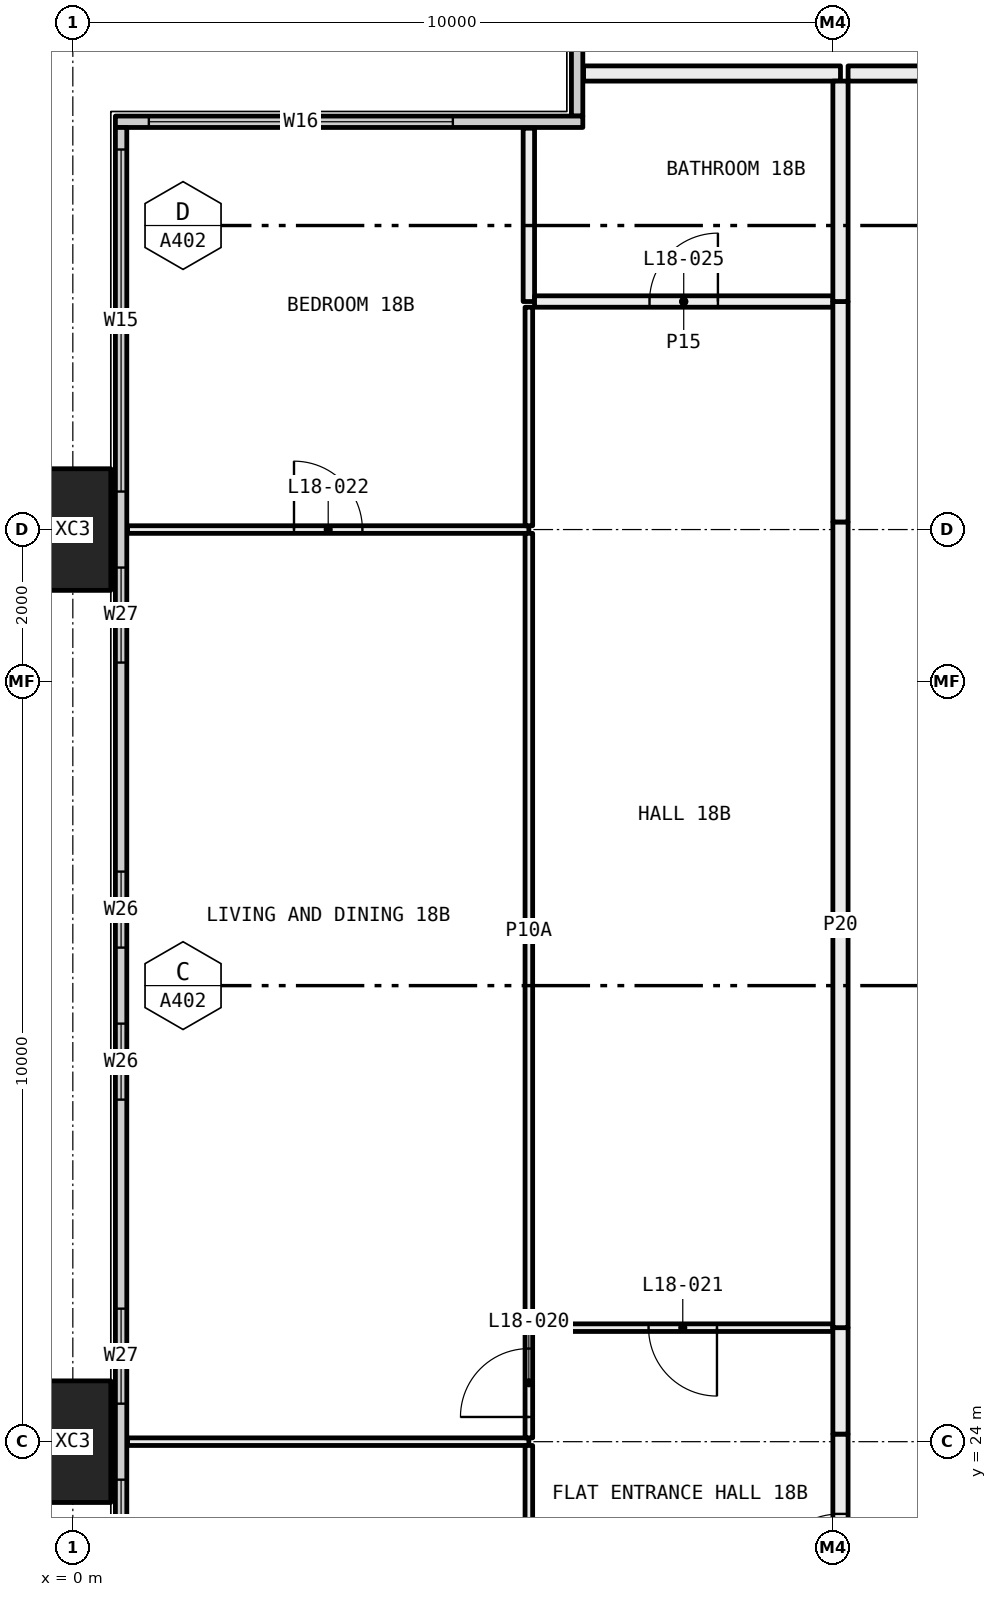
"""IFC4 building model, lengths in metres.
Left out: names, types, materials, properties, quantities, classifications, styles, units other than length and angle.
Written with IfcOpenShell. Run it as: python <this file> out.ifc"""

import sys

from ifc_helpers import new_model, si_unit, direction, frame, frame_2d, origin, origin_2d, place, context, subcontext, project, spatial, rectangle, hollow_rectangle, extrude, element, fill, save


model = new_model("IFC4")
c1 = context("Model", 3, precision=1e-05, world=origin(), true_north=direction((0.0, 1.0)))
c2 = subcontext(c1, "Body", "Model", "MODEL_VIEW")
j1 = project(units=[si_unit("LENGTHUNIT", "METRE"), si_unit("PLANEANGLEUNIT", "RADIAN")], contexts=[c1])
p1 = place(None, origin())
s1 = spatial("IfcSite", under=j1, at=p1, CompositionType="ELEMENT")
p2 = place(p1, origin())
s2 = spatial("IfcBuilding", under=s1, at=p2, CompositionType="ELEMENT")
p3 = place(p2, frame((0.0, 0.0, 74.85)))
s3 = spatial("IfcBuildingStorey", under=s2, at=p3, CompositionType="ELEMENT", Elevation=74.85)
for number, where, z_axis, x_axis in (
    (1, (0.0, 24.0, -0.4), (0.0, 0.0, 1.0), (0.0, 1.0, 0.0)),
    (2, (0.0, 36.0, -0.4), (0.0, 0.0, 1.0), (0.0, 1.0, 0.0)),
):
    element("IfcColumn", number, at=place(p3, frame(where, z_axis=z_axis, x_axis=x_axis)), inside=s3, PredefinedType="COLUMN", context=c2, shape_type="SweptSolid", body=[
        extrude(hollow_rectangle(XDim=1.6, YDim=1.0, WallThickness=0.065, at=origin_2d()), origin(), (0.0, 0.0, 1.0), 3.45),
    ])
p4 = place(p3, frame((6.635, 41.44, 0.0), z_axis=(0.0, 0.0, 1.0), x_axis=(0.0, 1.0, 0.0)))
e3 = element("IfcWall", 3, at=p4, inside=s3, PredefinedType="ELEMENTEDWALL", context=c2, shape_type="SweptSolid", body=[
    extrude(rectangle(XDim=5.85, YDim=0.15, at=frame_2d((2.925, 0.0))), origin(), (0.0, 0.0, 1.0), 3.05),
])
p5 = place(p4, frame((1.56, 0.0, 0.45)))
e4 = element("IfcOpeningElement", 4, at=p5, cuts=e3, PredefinedType="OPENING", context=c2, shape_type="SweptSolid", body=[
    extrude(rectangle(XDim=4.0, YDim=2.55, at=frame_2d((2.0, 1.275))), frame((0.0, 0.085, 0.0), z_axis=(0.0, -1.0, 0.0), x_axis=(1.0, 0.0, 0.0)), (0.0, 0.0, 1.0), 0.17),
])
p6 = place(p3, frame((0.56, 41.365, 0.0), z_axis=(0.0, 0.0, 1.0), x_axis=(1.0, 0.0, 0.0)))
e5 = element("IfcWall", 5, at=p6, inside=s3, PredefinedType="ELEMENTEDWALL", context=c2, shape_type="SweptSolid", body=[
    extrude(rectangle(XDim=6.15, YDim=0.15, at=frame_2d((3.075, 0.0))), origin(), (0.0, 0.0, 1.0), 3.05),
])
p7 = place(p6, frame((0.44, 0.0, 0.45)))
e6 = element("IfcOpeningElement", 6, at=p7, cuts=e5, PredefinedType="OPENING", context=c2, shape_type="SweptSolid", body=[
    extrude(rectangle(XDim=4.0, YDim=2.55, at=frame_2d((2.0, 1.275))), frame((0.0, 0.085, 0.0), z_axis=(0.0, -1.0, 0.0), x_axis=(1.0, 0.0, 0.0)), (0.0, 0.0, 1.0), 0.17),
])
p8 = place(p3, frame((0.635, 6.71, 0.0), z_axis=(0.0, 0.0, 1.0), x_axis=(0.0, 1.0, 0.0)))
e7 = element("IfcWall", 7, at=p8, inside=s3, PredefinedType="ELEMENTEDWALL", context=c2, shape_type="SweptSolid", body=[
    extrude(rectangle(XDim=34.58, YDim=0.15, at=frame_2d((17.29, 0.0))), origin(), (0.0, 0.0, 1.0), 3.05),
])
p9 = place(p8, frame((0.29, 0.0, 0.45)))
e8 = element("IfcOpeningElement", 8, at=p9, cuts=e7, PredefinedType="OPENING", context=c2, shape_type="SweptSolid", body=[
    extrude(rectangle(XDim=4.5, YDim=2.55, at=frame_2d((2.25, 1.275))), frame((0.0, 0.085, 0.0), z_axis=(0.0, -1.0, 0.0), x_axis=(1.0, 0.0, 0.0)), (0.0, 0.0, 1.0), 0.17),
])
p10 = place(p8, frame((5.79, 0.0, 0.45)))
e9 = element("IfcOpeningElement", 9, at=p10, cuts=e7, PredefinedType="OPENING", context=c2, shape_type="SweptSolid", body=[
    extrude(rectangle(XDim=1.25, YDim=2.55, at=frame_2d((0.625, 1.275))), frame((0.0, 0.085, 0.0), z_axis=(0.0, -1.0, 0.0), x_axis=(1.0, 0.0, 0.0)), (0.0, 0.0, 1.0), 0.17),
])
p11 = place(p8, frame((9.79, 0.0, 0.45)))
e10 = element("IfcOpeningElement", 10, at=p11, cuts=e7, PredefinedType="OPENING", context=c2, shape_type="SweptSolid", body=[
    extrude(rectangle(XDim=1.0, YDim=2.55, at=frame_2d((0.5, 1.275))), frame((0.0, 0.085, 0.0), z_axis=(0.0, -1.0, 0.0), x_axis=(1.0, 0.0, 0.0)), (0.0, 0.0, 1.0), 0.17),
])
p12 = place(p8, frame((11.79, 0.0, 0.45)))
e11 = element("IfcOpeningElement", 11, at=p12, cuts=e7, PredefinedType="OPENING", context=c2, shape_type="SweptSolid", body=[
    extrude(rectangle(XDim=1.0, YDim=2.55, at=frame_2d((0.5, 1.275))), frame((0.0, 0.085, 0.0), z_axis=(0.0, -1.0, 0.0), x_axis=(1.0, 0.0, 0.0)), (0.0, 0.0, 1.0), 0.17),
])
p13 = place(p8, frame((15.54, 0.0, 0.45)))
e12 = element("IfcOpeningElement", 12, at=p13, cuts=e7, PredefinedType="OPENING", context=c2, shape_type="SweptSolid", body=[
    extrude(rectangle(XDim=1.25, YDim=2.55, at=frame_2d((0.625, 1.275))), frame((0.0, 0.085, 0.0), z_axis=(0.0, -1.0, 0.0), x_axis=(1.0, 0.0, 0.0)), (0.0, 0.0, 1.0), 0.17),
])
p14 = place(p8, frame((17.79, 0.0, 0.45)))
e13 = element("IfcOpeningElement", 13, at=p14, cuts=e7, PredefinedType="OPENING", context=c2, shape_type="SweptSolid", body=[
    extrude(rectangle(XDim=1.25, YDim=2.55, at=frame_2d((0.625, 1.275))), frame((0.0, 0.085, 0.0), z_axis=(0.0, -1.0, 0.0), x_axis=(1.0, 0.0, 0.0)), (0.0, 0.0, 1.0), 0.17),
])
p15 = place(p8, frame((21.79, 0.0, 0.45)))
e14 = element("IfcOpeningElement", 14, at=p15, cuts=e7, PredefinedType="OPENING", context=c2, shape_type="SweptSolid", body=[
    extrude(rectangle(XDim=1.0, YDim=2.55, at=frame_2d((0.5, 1.275))), frame((0.0, 0.085, 0.0), z_axis=(0.0, -1.0, 0.0), x_axis=(1.0, 0.0, 0.0)), (0.0, 0.0, 1.0), 0.17),
])
p16 = place(p8, frame((23.79, 0.0, 0.45)))
e15 = element("IfcOpeningElement", 15, at=p16, cuts=e7, PredefinedType="OPENING", context=c2, shape_type="SweptSolid", body=[
    extrude(rectangle(XDim=1.0, YDim=2.55, at=frame_2d((0.5, 1.275))), frame((0.0, 0.085, 0.0), z_axis=(0.0, -1.0, 0.0), x_axis=(1.0, 0.0, 0.0)), (0.0, 0.0, 1.0), 0.17),
])
p17 = place(p8, frame((27.54, 0.0, 0.45)))
e16 = element("IfcOpeningElement", 16, at=p17, cuts=e7, PredefinedType="OPENING", context=c2, shape_type="SweptSolid", body=[
    extrude(rectangle(XDim=1.25, YDim=2.55, at=frame_2d((0.625, 1.275))), frame((0.0, 0.085, 0.0), z_axis=(0.0, -1.0, 0.0), x_axis=(1.0, 0.0, 0.0)), (0.0, 0.0, 1.0), 0.17),
])
p18 = place(p8, frame((29.79, 0.0, 0.45)))
e17 = element("IfcOpeningElement", 17, at=p18, cuts=e7, PredefinedType="OPENING", context=c2, shape_type="SweptSolid", body=[
    extrude(rectangle(XDim=4.5, YDim=2.55, at=frame_2d((2.25, 1.275))), frame((0.0, 0.085, 0.0), z_axis=(0.0, -1.0, 0.0), x_axis=(1.0, 0.0, 0.0)), (0.0, 0.0, 1.0), 0.17),
])
p19 = place(p3, frame((6.0, 24.0, 0.0), z_axis=(0.0, 0.0, 1.0), x_axis=(-1.0, 0.0, 0.0)))
e18 = element("IfcWall", 18, at=p19, inside=s3, PredefinedType="PARTITIONING", context=c2, shape_type="SweptSolid", body=[
    extrude(rectangle(XDim=5.28, YDim=0.1, at=frame_2d((2.64, 0.0))), origin(), (0.0, 0.0, 1.0), 2.45),
])
p20 = place(p3, frame((6.0, 21.075, 0.0), z_axis=(0.0, 0.0, 1.0), x_axis=(0.0, 1.0, 0.0)))
e19 = element("IfcWall", 19, at=p20, inside=s3, PredefinedType="PARTITIONING", context=c2, shape_type="SweptSolid", body=[
    extrude(rectangle(XDim=2.875, YDim=0.1, at=frame_2d((1.438, 0.0))), origin(), (0.0, 0.0, 1.0), 2.45),
])
p21 = place(p20, frame((0.988, 0.0, 0.0)))
e20 = element("IfcOpeningElement", 20, at=p21, cuts=e19, PredefinedType="OPENING", context=c2, shape_type="SweptSolid", body=[
    extrude(rectangle(XDim=0.9, YDim=2.1, at=frame_2d((0.45, 1.05))), frame((0.0, 0.06, 0.0), z_axis=(0.0, -1.0, 0.0), x_axis=(1.0, 0.0, 0.0)), (0.0, 0.0, 1.0), 0.12),
])
p22 = place(p3, frame((6.0, 36.0, 0.0), z_axis=(0.0, 0.0, 1.0), x_axis=(-1.0, 0.0, 0.0)))
e21 = element("IfcWall", 21, at=p22, inside=s3, PredefinedType="PARTITIONING", context=c2, shape_type="SweptSolid", body=[
    extrude(rectangle(XDim=5.28, YDim=0.1, at=frame_2d((2.64, 0.0))), origin(), (0.0, 0.0, 1.0), 2.45),
])
p23 = place(p22, frame((2.19, 0.0, 0.0)))
e22 = element("IfcOpeningElement", 22, at=p23, cuts=e21, PredefinedType="OPENING", context=c2, shape_type="SweptSolid", body=[
    extrude(rectangle(XDim=0.9, YDim=2.1, at=frame_2d((0.45, 1.05))), frame((0.0, 0.06, 0.0), z_axis=(0.0, -1.0, 0.0), x_axis=(1.0, 0.0, 0.0)), (0.0, 0.0, 1.0), 0.12),
])
p24 = place(p3, frame((6.0, 24.05, 0.0), z_axis=(0.0, 0.0, 1.0), x_axis=(0.0, 1.0, 0.0)))
e23 = element("IfcWall", 23, at=p24, inside=s3, PredefinedType="PARTITIONING", context=c2, shape_type="SweptSolid", body=[
    extrude(rectangle(XDim=1.45, YDim=0.1, at=frame_2d((0.725, 0.0))), origin(), (0.0, 0.0, 1.0), 2.45),
])
p25 = place(p24, frame((0.275, 0.0, 0.0)))
e24 = element("IfcOpeningElement", 24, at=p25, cuts=e23, PredefinedType="OPENING", context=c2, shape_type="SweptSolid", body=[
    extrude(rectangle(XDim=0.9, YDim=2.1, at=frame_2d((0.45, 1.05))), frame((0.0, 0.06, 0.0), z_axis=(0.0, -1.0, 0.0), x_axis=(1.0, 0.0, 0.0)), (0.0, 0.0, 1.0), 0.12),
])
p26 = place(p3, frame((6.0, 25.5, 0.0), z_axis=(0.0, 0.0, 1.0), x_axis=(0.0, 1.0, 0.0)))
e25 = element("IfcWall", 25, at=p26, inside=s3, PredefinedType="PARTITIONING", context=c2, shape_type="SweptSolid", body=[
    extrude(rectangle(XDim=10.45, YDim=0.1, at=frame_2d((5.225, 0.0))), origin(), (0.0, 0.0, 1.0), 2.45),
])
p27 = place(p3, frame((6.0, 36.05, 0.0), z_axis=(0.0, 0.0, 1.0), x_axis=(0.0, 1.0, 0.0)))
e26 = element("IfcWall", 26, at=p27, inside=s3, PredefinedType="PARTITIONING", context=c2, shape_type="SweptSolid", body=[
    extrude(rectangle(XDim=2.875, YDim=0.1, at=frame_2d((1.438, 0.0))), origin(), (0.0, 0.0, 1.0), 2.45),
])
p28 = place(p3, frame((6.0, 39.0, 0.0), z_axis=(0.0, 0.0, 1.0), x_axis=(0.0, 1.0, 0.0)))
e27 = element("IfcWall", 27, at=p28, inside=s3, PredefinedType="PARTITIONING", context=c2, shape_type="SweptSolid", body=[
    extrude(rectangle(XDim=2.28, YDim=0.15, at=frame_2d((1.14, 0.0))), origin(), (0.0, 0.0, 1.0), 3.05),
])
p29 = place(p3, frame((10.0, 25.5, 0.0), z_axis=(0.0, 0.0, 1.0), x_axis=(-1.0, 0.0, 0.0)))
e28 = element("IfcWall", 28, at=p29, inside=s3, PredefinedType="PARTITIONING", context=c2, shape_type="SweptSolid", body=[
    extrude(rectangle(XDim=3.95, YDim=0.1, at=frame_2d((1.975, 0.0))), origin(), (0.0, 0.0, 1.0), 3.05),
])
p30 = place(p29, frame((1.525, 0.0, 0.0)))
e29 = element("IfcOpeningElement", 29, at=p30, cuts=e28, PredefinedType="OPENING", context=c2, shape_type="SweptSolid", body=[
    extrude(rectangle(XDim=0.9, YDim=2.1, at=frame_2d((0.45, 1.05))), frame((0.0, 0.06, 0.0), z_axis=(0.0, -1.0, 0.0), x_axis=(1.0, 0.0, 0.0)), (0.0, 0.0, 1.0), 0.12),
])
p31 = place(p3, frame((10.1, 21.0, 0.0), z_axis=(0.0, 0.0, 1.0), x_axis=(0.0, 1.0, 0.0)))
e30 = element("IfcWall", 30, at=p31, inside=s3, PredefinedType="PARTITIONING", context=c2, shape_type="SweptSolid", body=[
    extrude(rectangle(XDim=3.1, YDim=0.2, at=frame_2d((1.55, 0.0))), origin(), (0.0, 0.0, 1.0), 2.45),
])
p32 = place(p31, frame((1.05, 0.0, 0.0)))
e31 = element("IfcOpeningElement", 31, at=p32, cuts=e30, PredefinedType="OPENING", context=c2, shape_type="SweptSolid", body=[
    extrude(rectangle(XDim=1.0, YDim=2.1, at=frame_2d((0.5, 1.05))), frame((0.0, 0.11, 0.0), z_axis=(0.0, -1.0, 0.0), x_axis=(1.0, 0.0, 0.0)), (0.0, 0.0, 1.0), 0.22),
])
p33 = place(p3, frame((10.1, 24.1, 0.0), z_axis=(0.0, 0.0, 1.0), x_axis=(0.0, 1.0, 0.0)))
e32 = element("IfcWall", 32, at=p33, inside=s3, PredefinedType="PARTITIONING", context=c2, shape_type="SweptSolid", body=[
    extrude(rectangle(XDim=1.4, YDim=0.2, at=frame_2d((0.7, 0.0))), origin(), (0.0, 0.0, 1.0), 3.05),
])
p34 = place(p3, frame((10.0, 39.0, 0.0), z_axis=(0.0, 0.0, 1.0), x_axis=(-1.0, 0.0, 0.0)))
e33 = element("IfcWall", 33, at=p34, inside=s3, PredefinedType="PARTITIONING", context=c2, shape_type="SweptSolid", body=[
    extrude(rectangle(XDim=3.925, YDim=0.15, at=frame_2d((1.962, 0.0))), origin(), (0.0, 0.0, 1.0), 3.05),
])
p35 = place(p34, frame((1.512, 0.0, 0.0)))
e34 = element("IfcOpeningElement", 34, at=p35, cuts=e33, PredefinedType="OPENING", context=c2, shape_type="SweptSolid", body=[
    extrude(rectangle(XDim=0.9, YDim=2.1, at=frame_2d((0.45, 1.05))), frame((0.0, 0.085, 0.0), z_axis=(0.0, -1.0, 0.0), x_axis=(1.0, 0.0, 0.0)), (0.0, 0.0, 1.0), 0.17),
])
p36 = place(p3, frame((10.1, 25.5, 0.0), z_axis=(0.0, 0.0, 1.0), x_axis=(0.0, 1.0, 0.0)))
e35 = element("IfcWall", 35, at=p36, inside=s3, PredefinedType="PARTITIONING", context=c2, shape_type="SweptSolid", body=[
    extrude(rectangle(XDim=10.6, YDim=0.2, at=frame_2d((5.3, 0.0))), origin(), (0.0, 0.0, 1.0), 2.45),
])
p37 = place(p3, frame((10.1, 36.1, 0.0), z_axis=(0.0, 0.0, 1.0), x_axis=(0.0, 1.0, 0.0)))
e36 = element("IfcWall", 36, at=p37, inside=s3, PredefinedType="PARTITIONING", context=c2, shape_type="SweptSolid", body=[
    extrude(rectangle(XDim=2.9, YDim=0.2, at=frame_2d((1.45, 0.0))), origin(), (0.0, 0.0, 1.0), 3.05),
])
p38 = place(p3, frame((10.1, 42.0, 0.0), z_axis=(0.0, 0.0, 1.0), x_axis=(-1.0, 0.0, 0.0)))
e37 = element("IfcWall", 37, at=p38, inside=s3, PredefinedType="PARTITIONING", context=c2, shape_type="SweptSolid", body=[
    extrude(rectangle(XDim=3.38, YDim=0.2, at=frame_2d((1.69, 0.0))), origin(), (0.0, 0.0, 1.0), 3.05),
])
p39 = place(p3, frame((10.1, 39.0, 0.0), z_axis=(0.0, 0.0, 1.0), x_axis=(0.0, 1.0, 0.0)))
e38 = element("IfcWall", 38, at=p39, inside=s3, PredefinedType="PARTITIONING", context=c2, shape_type="SweptSolid", body=[
    extrude(rectangle(XDim=2.9, YDim=0.2, at=frame_2d((1.45, 0.0))), origin(), (0.0, 0.0, 1.0), 3.05),
])
p40 = place(p3, frame((10.2, 42.0, 0.0), z_axis=(0.0, 0.0, 1.0), x_axis=(1.0, 0.0, 0.0)))
e39 = element("IfcWall", 39, at=p40, inside=s3, PredefinedType="PARTITIONING", context=c2, shape_type="SweptSolid", body=[
    extrude(rectangle(XDim=1.8, YDim=0.2, at=frame_2d((0.9, 0.0))), origin(), (0.0, 0.0, 1.0), 3.05),
])
p41 = place(p7, origin())
e40 = element("IfcWindow", 40, at=p41, inside=s3, PartitioningType="SINGLE_PANEL", PredefinedType="WINDOW", context=c2, shape_type="SweptSolid", body=[
    extrude(rectangle(XDim=4.0, YDim=2.55, at=frame_2d((2.0, 1.275))), frame((0.0, 0.03, 0.0), z_axis=(0.0, -1.0, 0.0), x_axis=(1.0, 0.0, 0.0)), (0.0, 0.0, 1.0), 0.06),
])
fill(e6, e40)
p42 = place(p13, origin())
e41 = element("IfcWindow", 41, at=p42, inside=s3, PartitioningType="SINGLE_PANEL", PredefinedType="WINDOW", context=c2, shape_type="SweptSolid", body=[
    extrude(rectangle(XDim=1.25, YDim=2.55, at=frame_2d((0.625, 1.275))), frame((0.0, 0.03, 0.0), z_axis=(0.0, -1.0, 0.0), x_axis=(1.0, 0.0, 0.0)), (0.0, 0.0, 1.0), 0.06),
])
fill(e12, e41)
p43 = place(p14, origin())
e42 = element("IfcWindow", 42, at=p43, inside=s3, PartitioningType="SINGLE_PANEL", PredefinedType="WINDOW", context=c2, shape_type="SweptSolid", body=[
    extrude(rectangle(XDim=1.25, YDim=2.55, at=frame_2d((0.625, 1.275))), frame((0.0, 0.03, 0.0), z_axis=(0.0, -1.0, 0.0), x_axis=(1.0, 0.0, 0.0)), (0.0, 0.0, 1.0), 0.06),
])
fill(e13, e42)
p44 = place(p15, origin())
e43 = element("IfcWindow", 43, at=p44, inside=s3, PartitioningType="SINGLE_PANEL", PredefinedType="WINDOW", context=c2, shape_type="SweptSolid", body=[
    extrude(rectangle(XDim=1.0, YDim=2.55, at=frame_2d((0.5, 1.275))), frame((0.0, 0.03, 0.0), z_axis=(0.0, -1.0, 0.0), x_axis=(1.0, 0.0, 0.0)), (0.0, 0.0, 1.0), 0.06),
])
fill(e14, e43)
p45 = place(p16, origin())
e44 = element("IfcWindow", 44, at=p45, inside=s3, PartitioningType="SINGLE_PANEL", PredefinedType="WINDOW", context=c2, shape_type="SweptSolid", body=[
    extrude(rectangle(XDim=1.0, YDim=2.55, at=frame_2d((0.5, 1.275))), frame((0.0, 0.03, 0.0), z_axis=(0.0, -1.0, 0.0), x_axis=(1.0, 0.0, 0.0)), (0.0, 0.0, 1.0), 0.06),
])
fill(e15, e44)
p46 = place(p17, origin())
e45 = element("IfcWindow", 45, at=p46, inside=s3, PartitioningType="SINGLE_PANEL", PredefinedType="WINDOW", context=c2, shape_type="SweptSolid", body=[
    extrude(rectangle(XDim=1.25, YDim=2.55, at=frame_2d((0.625, 1.275))), frame((0.0, 0.03, 0.0), z_axis=(0.0, -1.0, 0.0), x_axis=(1.0, 0.0, 0.0)), (0.0, 0.0, 1.0), 0.06),
])
fill(e16, e45)
p47 = place(p18, origin())
e46 = element("IfcWindow", 46, at=p47, inside=s3, PartitioningType="SINGLE_PANEL", PredefinedType="WINDOW", context=c2, shape_type="SweptSolid", body=[
    extrude(rectangle(XDim=4.5, YDim=2.55, at=frame_2d((2.25, 1.275))), frame((0.0, 0.03, 0.0), z_axis=(0.0, -1.0, 0.0), x_axis=(1.0, 0.0, 0.0)), (0.0, 0.0, 1.0), 0.06),
])
fill(e17, e46)
p48 = place(p32, origin())
e47 = element("IfcDoor", 47, at=p48, inside=s3, OperationType="SINGLE_SWING_RIGHT", PredefinedType="DOOR", context=c2, shape_type="SweptSolid", body=[
    extrude(rectangle(XDim=1.0, YDim=2.1, at=frame_2d((0.5, 1.05))), frame((0.0, 0.025, 0.0), z_axis=(0.0, -1.0, 0.0), x_axis=(1.0, 0.0, 0.0)), (0.0, 0.0, 1.0), 0.05),
])
fill(e31, e47)
p49 = place(p25, origin())
e48 = element("IfcDoor", 48, at=p49, inside=s3, OperationType="SINGLE_SWING_RIGHT", PredefinedType="DOOR", context=c2, shape_type="SweptSolid", body=[
    extrude(rectangle(XDim=0.9, YDim=2.1, at=frame_2d((0.45, 1.05))), frame((0.0, 0.025, 0.0), z_axis=(0.0, -1.0, 0.0), x_axis=(1.0, 0.0, 0.0)), (0.0, 0.0, 1.0), 0.05),
])
fill(e24, e48)
p50 = place(p30, origin())
e49 = element("IfcDoor", 49, at=p50, inside=s3, OperationType="SINGLE_SWING_RIGHT", PredefinedType="DOOR", context=c2, shape_type="SweptSolid", body=[
    extrude(rectangle(XDim=0.9, YDim=2.1, at=frame_2d((0.45, 1.05))), frame((0.0, 0.025, 0.0), z_axis=(0.0, -1.0, 0.0), x_axis=(1.0, 0.0, 0.0)), (0.0, 0.0, 1.0), 0.05),
])
fill(e29, e49)
p51 = place(p23, frame((0.9, 0.0, 0.0), x_axis=(-1.0, 0.0, 0.0)))
e50 = element("IfcDoor", 50, at=p51, inside=s3, OperationType="SINGLE_SWING_RIGHT", PredefinedType="DOOR", context=c2, shape_type="SweptSolid", body=[
    extrude(rectangle(XDim=0.9, YDim=2.1, at=frame_2d((0.45, 1.05))), frame((0.0, 0.025, 0.0), z_axis=(0.0, -1.0, 0.0), x_axis=(1.0, 0.0, 0.0)), (0.0, 0.0, 1.0), 0.05),
])
fill(e22, e50)
p52 = place(p35, frame((0.9, 0.0, 0.0), x_axis=(-1.0, 0.0, 0.0)))
e51 = element("IfcDoor", 51, at=p52, inside=s3, OperationType="SINGLE_SWING_LEFT", PredefinedType="DOOR", context=c2, shape_type="SweptSolid", body=[
    extrude(rectangle(XDim=0.9, YDim=2.1, at=frame_2d((0.45, 1.05))), frame((0.0, 0.025, 0.0), z_axis=(0.0, -1.0, 0.0), x_axis=(1.0, 0.0, 0.0)), (0.0, 0.0, 1.0), 0.05),
])
fill(e34, e51)
save(model, sys.argv[1])
